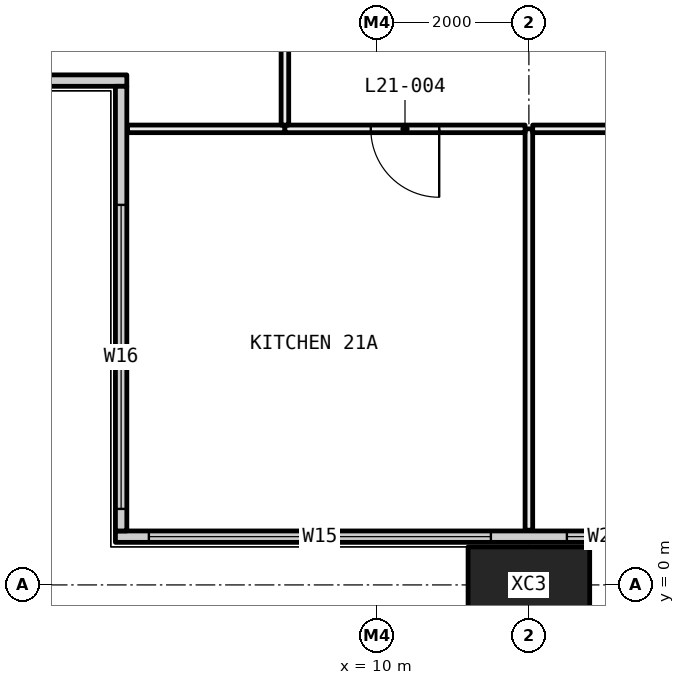
"""IFC4 building model, lengths in metres.
Left out: names, types, materials, properties, quantities, classifications, styles, units other than length and angle.
Written with IfcOpenShell. Run it as: python <this file> out.ifc"""

import sys

from ifc_helpers import new_model, si_unit, direction, frame, frame_2d, origin, origin_2d, place, context, subcontext, project, spatial, rectangle, hollow_rectangle, extrude, element, fill, save


model = new_model("IFC4")
c1 = context("Model", 3, precision=1e-05, world=origin(), true_north=direction((0.0, 1.0)))
c2 = subcontext(c1, "Body", "Model", "MODEL_VIEW")
j1 = project(units=[si_unit("LENGTHUNIT", "METRE"), si_unit("PLANEANGLEUNIT", "RADIAN")], contexts=[c1])
p1 = place(None, origin())
s1 = spatial("IfcSite", under=j1, at=p1, CompositionType="ELEMENT")
p2 = place(p1, origin())
s2 = spatial("IfcBuilding", under=s1, at=p2, CompositionType="ELEMENT")
p3 = place(p2, frame((0.0, 0.0, 85.2)))
s3 = spatial("IfcBuildingStorey", under=s2, at=p3, CompositionType="ELEMENT", Elevation=85.2)
p4 = place(p3, frame((12.0, 0.0, -0.4), z_axis=(0.0, 0.0, 1.0), x_axis=(1.0, 0.0, 0.0)))
e1 = element("IfcColumn", 1, at=p4, inside=s3, PredefinedType="COLUMN", context=c2, shape_type="SweptSolid", body=[
    extrude(hollow_rectangle(XDim=1.6, YDim=1.0, WallThickness=0.065, at=origin_2d()), origin(), (0.0, 0.0, 1.0), 3.45),
])
p5 = place(p3, frame((6.56, 0.635, 0.0), z_axis=(0.0, 0.0, 1.0), x_axis=(1.0, 0.0, 0.0)))
e2 = element("IfcWall", 2, at=p5, inside=s3, PredefinedType="ELEMENTEDWALL", context=c2, shape_type="SweptSolid", body=[
    extrude(rectangle(XDim=58.88, YDim=0.15, at=frame_2d((29.44, 0.0))), origin(), (0.0, 0.0, 1.0), 3.05),
])
p6 = place(p5, frame((0.44, 0.0, 0.45)))
e3 = element("IfcOpeningElement", 3, at=p6, cuts=e2, PredefinedType="OPENING", context=c2, shape_type="SweptSolid", body=[
    extrude(rectangle(XDim=4.5, YDim=2.55, at=frame_2d((2.25, 1.275))), frame((0.0, 0.085, 0.0), z_axis=(0.0, -1.0, 0.0), x_axis=(1.0, 0.0, 0.0)), (0.0, 0.0, 1.0), 0.17),
])
p7 = place(p5, frame((5.94, 0.0, 0.45)))
e4 = element("IfcOpeningElement", 4, at=p7, cuts=e2, PredefinedType="OPENING", context=c2, shape_type="SweptSolid", body=[
    extrude(rectangle(XDim=1.0, YDim=2.55, at=frame_2d((0.5, 1.275))), frame((0.0, 0.085, 0.0), z_axis=(0.0, -1.0, 0.0), x_axis=(1.0, 0.0, 0.0)), (0.0, 0.0, 1.0), 0.17),
])
p8 = place(p5, frame((9.69, 0.0, 0.45)))
e5 = element("IfcOpeningElement", 5, at=p8, cuts=e2, PredefinedType="OPENING", context=c2, shape_type="SweptSolid", body=[
    extrude(rectangle(XDim=1.25, YDim=2.55, at=frame_2d((0.625, 1.275))), frame((0.0, 0.085, 0.0), z_axis=(0.0, -1.0, 0.0), x_axis=(1.0, 0.0, 0.0)), (0.0, 0.0, 1.0), 0.17),
])
p9 = place(p5, frame((11.94, 0.0, 0.45)))
e6 = element("IfcOpeningElement", 6, at=p9, cuts=e2, PredefinedType="OPENING", context=c2, shape_type="SweptSolid", body=[
    extrude(rectangle(XDim=1.25, YDim=2.55, at=frame_2d((0.625, 1.275))), frame((0.0, 0.085, 0.0), z_axis=(0.0, -1.0, 0.0), x_axis=(1.0, 0.0, 0.0)), (0.0, 0.0, 1.0), 0.17),
])
p10 = place(p5, frame((15.94, 0.0, 0.45)))
e7 = element("IfcOpeningElement", 7, at=p10, cuts=e2, PredefinedType="OPENING", context=c2, shape_type="SweptSolid", body=[
    extrude(rectangle(XDim=1.0, YDim=2.55, at=frame_2d((0.5, 1.275))), frame((0.0, 0.085, 0.0), z_axis=(0.0, -1.0, 0.0), x_axis=(1.0, 0.0, 0.0)), (0.0, 0.0, 1.0), 0.17),
])
p11 = place(p5, frame((17.94, 0.0, 0.45)))
e8 = element("IfcOpeningElement", 8, at=p11, cuts=e2, PredefinedType="OPENING", context=c2, shape_type="SweptSolid", body=[
    extrude(rectangle(XDim=1.0, YDim=2.55, at=frame_2d((0.5, 1.275))), frame((0.0, 0.085, 0.0), z_axis=(0.0, -1.0, 0.0), x_axis=(1.0, 0.0, 0.0)), (0.0, 0.0, 1.0), 0.17),
])
p12 = place(p5, frame((21.69, 0.0, 0.45)))
e9 = element("IfcOpeningElement", 9, at=p12, cuts=e2, PredefinedType="OPENING", context=c2, shape_type="SweptSolid", body=[
    extrude(rectangle(XDim=1.25, YDim=2.55, at=frame_2d((0.625, 1.275))), frame((0.0, 0.085, 0.0), z_axis=(0.0, -1.0, 0.0), x_axis=(1.0, 0.0, 0.0)), (0.0, 0.0, 1.0), 0.17),
])
p13 = place(p5, frame((23.94, 0.0, 0.45)))
e10 = element("IfcOpeningElement", 10, at=p13, cuts=e2, PredefinedType="OPENING", context=c2, shape_type="SweptSolid", body=[
    extrude(rectangle(XDim=1.25, YDim=2.55, at=frame_2d((0.625, 1.275))), frame((0.0, 0.085, 0.0), z_axis=(0.0, -1.0, 0.0), x_axis=(1.0, 0.0, 0.0)), (0.0, 0.0, 1.0), 0.17),
])
p14 = place(p5, frame((27.94, 0.0, 0.45)))
e11 = element("IfcOpeningElement", 11, at=p14, cuts=e2, PredefinedType="OPENING", context=c2, shape_type="SweptSolid", body=[
    extrude(rectangle(XDim=1.0, YDim=2.55, at=frame_2d((0.5, 1.275))), frame((0.0, 0.085, 0.0), z_axis=(0.0, -1.0, 0.0), x_axis=(1.0, 0.0, 0.0)), (0.0, 0.0, 1.0), 0.17),
])
p15 = place(p5, frame((29.94, 0.0, 0.45)))
e12 = element("IfcOpeningElement", 12, at=p15, cuts=e2, PredefinedType="OPENING", context=c2, shape_type="SweptSolid", body=[
    extrude(rectangle(XDim=1.0, YDim=2.55, at=frame_2d((0.5, 1.275))), frame((0.0, 0.085, 0.0), z_axis=(0.0, -1.0, 0.0), x_axis=(1.0, 0.0, 0.0)), (0.0, 0.0, 1.0), 0.17),
])
p16 = place(p5, frame((33.69, 0.0, 0.45)))
e13 = element("IfcOpeningElement", 13, at=p16, cuts=e2, PredefinedType="OPENING", context=c2, shape_type="SweptSolid", body=[
    extrude(rectangle(XDim=1.25, YDim=2.55, at=frame_2d((0.625, 1.275))), frame((0.0, 0.085, 0.0), z_axis=(0.0, -1.0, 0.0), x_axis=(1.0, 0.0, 0.0)), (0.0, 0.0, 1.0), 0.17),
])
p17 = place(p5, frame((35.94, 0.0, 0.45)))
e14 = element("IfcOpeningElement", 14, at=p17, cuts=e2, PredefinedType="OPENING", context=c2, shape_type="SweptSolid", body=[
    extrude(rectangle(XDim=1.25, YDim=2.55, at=frame_2d((0.625, 1.275))), frame((0.0, 0.085, 0.0), z_axis=(0.0, -1.0, 0.0), x_axis=(1.0, 0.0, 0.0)), (0.0, 0.0, 1.0), 0.17),
])
p18 = place(p5, frame((39.94, 0.0, 0.45)))
e15 = element("IfcOpeningElement", 15, at=p18, cuts=e2, PredefinedType="OPENING", context=c2, shape_type="SweptSolid", body=[
    extrude(rectangle(XDim=1.0, YDim=2.55, at=frame_2d((0.5, 1.275))), frame((0.0, 0.085, 0.0), z_axis=(0.0, -1.0, 0.0), x_axis=(1.0, 0.0, 0.0)), (0.0, 0.0, 1.0), 0.17),
])
p19 = place(p5, frame((41.94, 0.0, 0.45)))
e16 = element("IfcOpeningElement", 16, at=p19, cuts=e2, PredefinedType="OPENING", context=c2, shape_type="SweptSolid", body=[
    extrude(rectangle(XDim=1.0, YDim=2.55, at=frame_2d((0.5, 1.275))), frame((0.0, 0.085, 0.0), z_axis=(0.0, -1.0, 0.0), x_axis=(1.0, 0.0, 0.0)), (0.0, 0.0, 1.0), 0.17),
])
p20 = place(p5, frame((45.69, 0.0, 0.45)))
e17 = element("IfcOpeningElement", 17, at=p20, cuts=e2, PredefinedType="OPENING", context=c2, shape_type="SweptSolid", body=[
    extrude(rectangle(XDim=1.25, YDim=2.55, at=frame_2d((0.625, 1.275))), frame((0.0, 0.085, 0.0), z_axis=(0.0, -1.0, 0.0), x_axis=(1.0, 0.0, 0.0)), (0.0, 0.0, 1.0), 0.17),
])
p21 = place(p5, frame((47.94, 0.0, 0.45)))
e18 = element("IfcOpeningElement", 18, at=p21, cuts=e2, PredefinedType="OPENING", context=c2, shape_type="SweptSolid", body=[
    extrude(rectangle(XDim=1.25, YDim=2.55, at=frame_2d((0.625, 1.275))), frame((0.0, 0.085, 0.0), z_axis=(0.0, -1.0, 0.0), x_axis=(1.0, 0.0, 0.0)), (0.0, 0.0, 1.0), 0.17),
])
p22 = place(p5, frame((51.94, 0.0, 0.45)))
e19 = element("IfcOpeningElement", 19, at=p22, cuts=e2, PredefinedType="OPENING", context=c2, shape_type="SweptSolid", body=[
    extrude(rectangle(XDim=1.0, YDim=2.55, at=frame_2d((0.5, 1.275))), frame((0.0, 0.085, 0.0), z_axis=(0.0, -1.0, 0.0), x_axis=(1.0, 0.0, 0.0)), (0.0, 0.0, 1.0), 0.17),
])
p23 = place(p5, frame((53.94, 0.0, 0.45)))
e20 = element("IfcOpeningElement", 20, at=p23, cuts=e2, PredefinedType="OPENING", context=c2, shape_type="SweptSolid", body=[
    extrude(rectangle(XDim=4.5, YDim=2.55, at=frame_2d((2.25, 1.275))), frame((0.0, 0.085, 0.0), z_axis=(0.0, -1.0, 0.0), x_axis=(1.0, 0.0, 0.0)), (0.0, 0.0, 1.0), 0.17),
])
p24 = place(p3, frame((0.56, 6.635, 0.0), z_axis=(0.0, 0.0, 1.0), x_axis=(1.0, 0.0, 0.0)))
e21 = element("IfcWall", 21, at=p24, inside=s3, PredefinedType="ELEMENTEDWALL", context=c2, shape_type="SweptSolid", body=[
    extrude(rectangle(XDim=6.15, YDim=0.15, at=frame_2d((3.075, 0.0))), origin(), (0.0, 0.0, 1.0), 3.05),
])
p25 = place(p24, frame((0.44, 0.0, 0.45)))
e22 = element("IfcOpeningElement", 22, at=p25, cuts=e21, PredefinedType="OPENING", context=c2, shape_type="SweptSolid", body=[
    extrude(rectangle(XDim=4.0, YDim=2.55, at=frame_2d((2.0, 1.275))), frame((0.0, 0.085, 0.0), z_axis=(0.0, -1.0, 0.0), x_axis=(1.0, 0.0, 0.0)), (0.0, 0.0, 1.0), 0.17),
])
p26 = place(p3, frame((6.635, 0.71, 0.0), z_axis=(0.0, 0.0, 1.0), x_axis=(0.0, 1.0, 0.0)))
e23 = element("IfcWall", 23, at=p26, inside=s3, PredefinedType="ELEMENTEDWALL", context=c2, shape_type="SweptSolid", body=[
    extrude(rectangle(XDim=5.85, YDim=0.15, at=frame_2d((2.925, 0.0))), origin(), (0.0, 0.0, 1.0), 3.05),
])
p27 = place(p26, frame((0.29, 0.0, 0.45)))
e24 = element("IfcOpeningElement", 24, at=p27, cuts=e23, PredefinedType="OPENING", context=c2, shape_type="SweptSolid", body=[
    extrude(rectangle(XDim=4.0, YDim=2.55, at=frame_2d((2.0, 1.275))), frame((0.0, 0.085, 0.0), z_axis=(0.0, -1.0, 0.0), x_axis=(1.0, 0.0, 0.0)), (0.0, 0.0, 1.0), 0.17),
])
p28 = place(p3, frame((12.0, 0.72, 0.0), z_axis=(0.0, 0.0, 1.0), x_axis=(0.0, 1.0, 0.0)))
e25 = element("IfcWall", 25, at=p28, inside=s3, PredefinedType="PARTITIONING", context=c2, shape_type="SweptSolid", body=[
    extrude(rectangle(XDim=5.28, YDim=0.1, at=frame_2d((2.64, 0.0))), origin(), (0.0, 0.0, 1.0), 2.45),
])
p29 = place(p3, frame((8.79, 6.0, 0.0), z_axis=(0.0, 0.0, 1.0), x_axis=(-1.0, 0.0, 0.0)))
e26 = element("IfcWall", 26, at=p29, inside=s3, PredefinedType="PARTITIONING", context=c2, shape_type="SweptSolid", body=[
    extrude(rectangle(XDim=2.07, YDim=0.1, at=frame_2d((1.035, 0.0))), origin(), (0.0, 0.0, 1.0), 3.05),
])
p30 = place(p3, frame((11.95, 6.0, 0.0), z_axis=(0.0, 0.0, 1.0), x_axis=(-1.0, 0.0, 0.0)))
e27 = element("IfcWall", 27, at=p30, inside=s3, PredefinedType="PARTITIONING", context=c2, shape_type="SweptSolid", body=[
    extrude(rectangle(XDim=3.16, YDim=0.1, at=frame_2d((1.58, 0.0))), origin(), (0.0, 0.0, 1.0), 2.45),
])
p31 = place(p30, frame((1.13, 0.0, 0.0)))
e28 = element("IfcOpeningElement", 28, at=p31, cuts=e27, PredefinedType="OPENING", context=c2, shape_type="SweptSolid", body=[
    extrude(rectangle(XDim=0.9, YDim=2.1, at=frame_2d((0.45, 1.05))), frame((0.0, 0.06, 0.0), z_axis=(0.0, -1.0, 0.0), x_axis=(1.0, 0.0, 0.0)), (0.0, 0.0, 1.0), 0.12),
])
p32 = place(p3, frame((16.86, 6.0, 0.0), z_axis=(0.0, 0.0, 1.0), x_axis=(-1.0, 0.0, 0.0)))
e29 = element("IfcWall", 29, at=p32, inside=s3, PredefinedType="PARTITIONING", context=c2, shape_type="SweptSolid", body=[
    extrude(rectangle(XDim=4.81, YDim=0.1, at=frame_2d((2.405, 0.0))), origin(), (0.0, 0.0, 1.0), 2.45),
])
p33 = place(p32, frame((1.955, 0.0, 0.0)))
e30 = element("IfcOpeningElement", 30, at=p33, cuts=e29, PredefinedType="OPENING", context=c2, shape_type="SweptSolid", body=[
    extrude(rectangle(XDim=0.9, YDim=2.1, at=frame_2d((0.45, 1.05))), frame((0.0, 0.06, 0.0), z_axis=(0.0, -1.0, 0.0), x_axis=(1.0, 0.0, 0.0)), (0.0, 0.0, 1.0), 0.12),
])
p34 = place(p3, frame((8.79, 6.05, 0.0), z_axis=(0.0, 0.0, 1.0), x_axis=(0.0, 1.0, 0.0)))
e31 = element("IfcWall", 31, at=p34, inside=s3, PredefinedType="PARTITIONING", context=c2, shape_type="SweptSolid", body=[
    extrude(rectangle(XDim=5.95, YDim=0.1, at=frame_2d((2.975, 0.0))), origin(), (0.0, 0.0, 1.0), 2.45),
])
p35 = place(p34, frame((2.525, 0.0, 0.0)))
e32 = element("IfcOpeningElement", 32, at=p35, cuts=e31, PredefinedType="OPENING", context=c2, shape_type="SweptSolid", body=[
    extrude(rectangle(XDim=0.9, YDim=2.1, at=frame_2d((0.45, 1.05))), frame((0.0, 0.06, 0.0), z_axis=(0.0, -1.0, 0.0), x_axis=(1.0, 0.0, 0.0)), (0.0, 0.0, 1.0), 0.12),
])
p36 = place(p6, origin())
e33 = element("IfcWindow", 33, at=p36, inside=s3, PartitioningType="SINGLE_PANEL", PredefinedType="WINDOW", context=c2, shape_type="SweptSolid", body=[
    extrude(rectangle(XDim=4.5, YDim=2.55, at=frame_2d((2.25, 1.275))), frame((0.0, 0.03, 0.0), z_axis=(0.0, -1.0, 0.0), x_axis=(1.0, 0.0, 0.0)), (0.0, 0.0, 1.0), 0.06),
])
fill(e3, e33)
p37 = place(p7, origin())
e34 = element("IfcWindow", 34, at=p37, inside=s3, PartitioningType="SINGLE_PANEL", PredefinedType="WINDOW", context=c2, shape_type="SweptSolid", body=[
    extrude(rectangle(XDim=1.0, YDim=2.55, at=frame_2d((0.5, 1.275))), frame((0.0, 0.03, 0.0), z_axis=(0.0, -1.0, 0.0), x_axis=(1.0, 0.0, 0.0)), (0.0, 0.0, 1.0), 0.06),
])
fill(e4, e34)
p38 = place(p27, origin())
e35 = element("IfcWindow", 35, at=p38, inside=s3, PartitioningType="SINGLE_PANEL", PredefinedType="WINDOW", context=c2, shape_type="SweptSolid", body=[
    extrude(rectangle(XDim=4.0, YDim=2.55, at=frame_2d((2.0, 1.275))), frame((0.0, 0.03, 0.0), z_axis=(0.0, -1.0, 0.0), x_axis=(1.0, 0.0, 0.0)), (0.0, 0.0, 1.0), 0.06),
])
fill(e24, e35)
p39 = place(p31, origin())
e36 = element("IfcDoor", 36, at=p39, inside=s3, OperationType="SINGLE_SWING_RIGHT", PredefinedType="DOOR", context=c2, shape_type="SweptSolid", body=[
    extrude(rectangle(XDim=0.9, YDim=2.1, at=frame_2d((0.45, 1.05))), frame((0.0, 0.025, 0.0), z_axis=(0.0, -1.0, 0.0), x_axis=(1.0, 0.0, 0.0)), (0.0, 0.0, 1.0), 0.05),
])
fill(e28, e36)
save(model, sys.argv[1])
